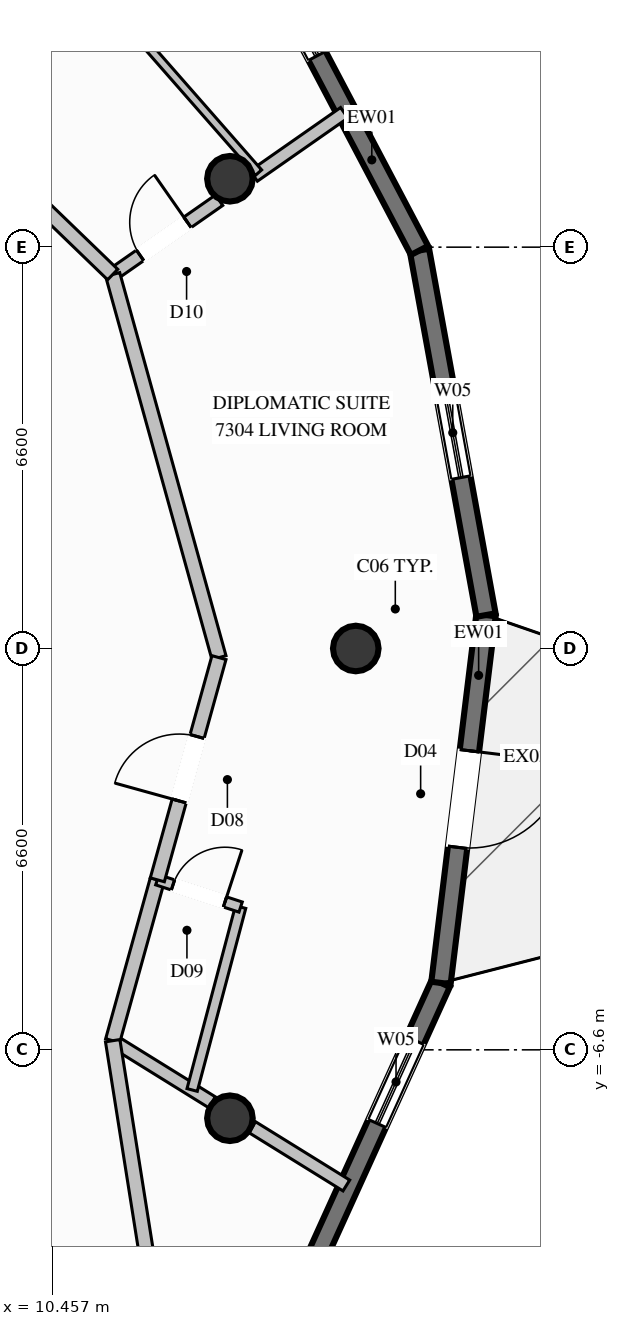
"""IFC4 building model, lengths in metres.
Left out: names, types, materials, properties, quantities, classifications, styles, units other than length and angle.
Written with IfcOpenShell. Run it as: python <this file> out.ifc"""

import sys

from ifc_helpers import new_model, si_unit, direction, frame, frame_2d, origin, origin_2d, place, context, subcontext, project, spatial, rectangle, circle, extrude, element, fill, save


model = new_model("IFC4")
c1 = context("Model", 3, precision=1e-05, world=origin(), true_north=direction((0.0, 1.0)))
c2 = subcontext(c1, "Body", "Model", "MODEL_VIEW")
j1 = project(units=[si_unit("LENGTHUNIT", "METRE"), si_unit("PLANEANGLEUNIT", "RADIAN")], contexts=[c1])
p1 = place(None, origin())
s1 = spatial("IfcSite", under=j1, at=p1, CompositionType="ELEMENT")
p2 = place(p1, origin())
s2 = spatial("IfcBuilding", under=s1, at=p2, CompositionType="ELEMENT")
p3 = place(p2, frame((0.0, 0.0, 274.4)))
s3 = spatial("IfcBuildingStorey", under=s2, at=p3, CompositionType="ELEMENT", Elevation=274.4)
for number, where, z_axis, x_axis in (
    (1, (15.45, 0.0, 0.0), (0.0, 0.0, 1.0), (1.0, 0.0, 0.0)),
    (2, (13.38, 7.725, 0.0), (0.0, 0.0, 1.0), (1.0, 0.0, 0.0)),
    (3, (13.38, -7.725, 0.0), (0.0, 0.0, 1.0), (1.0, 0.0, 0.0)),
):
    element("IfcColumn", number, at=place(p3, frame(where, z_axis=z_axis, x_axis=x_axis)), inside=s3, PredefinedType="COLUMN", context=c2, shape_type="SweptSolid", body=[
        extrude(circle(Radius=0.375, at=origin_2d()), origin(), (0.0, 0.0, 1.0), 3.8),
    ])
p4 = place(p3, frame((16.851, -5.5, 0.0), z_axis=(0.0, 0.0, 1.0), x_axis=(-0.413325805639, -0.910583207836, 0.0)))
e4 = element("IfcWall", 4, at=p4, inside=s3, PredefinedType="SOLIDWALL", context=c2, shape_type="SweptSolid", body=[
    extrude(rectangle(XDim=6.053, YDim=0.32, at=frame_2d((3.027, 0.0))), origin(), (0.0, 0.0, 1.0), 3.57),
])
p5 = place(p4, frame((1.038, 0.0, 0.85)))
e5 = element("IfcOpeningElement", 5, at=p5, cuts=e4, PredefinedType="OPENING", context=c2, shape_type="SweptSolid", body=[
    extrude(rectangle(XDim=1.5, YDim=1.2, at=frame_2d((0.75, 0.6))), frame((0.0, 0.17, 0.0), z_axis=(0.0, -1.0, 0.0), x_axis=(1.0, 0.0, 0.0)), (0.0, 0.0, 1.0), 0.34),
])
p6 = place(p3, frame((17.592, 0.55, 0.0), z_axis=(0.0, 0.0, 1.0), x_axis=(-0.121564545791, -0.992583528579, 0.0)))
e6 = element("IfcWall", 6, at=p6, inside=s3, PredefinedType="SOLIDWALL", context=c2, shape_type="SweptSolid", body=[
    extrude(rectangle(XDim=6.095, YDim=0.32, at=frame_2d((3.048, 0.0))), origin(), (0.0, 0.0, 1.0), 3.57),
])
p7 = place(p6, frame((2.248, 0.0, 0.0)))
e7 = element("IfcOpeningElement", 7, at=p7, cuts=e6, PredefinedType="OPENING", context=c2, shape_type="SweptSolid", body=[
    extrude(rectangle(XDim=1.6, YDim=2.3, at=frame_2d((0.8, 1.15))), frame((0.0, 0.17, 0.0), z_axis=(0.0, -1.0, 0.0), x_axis=(1.0, 0.0, 0.0)), (0.0, 0.0, 1.0), 0.34),
])
p8 = place(p3, frame((16.498, 6.546, 0.0), z_axis=(0.0, 0.0, 1.0), x_axis=(0.179495230974, -0.983758843446, 0.0)))
e8 = element("IfcWall", 8, at=p8, inside=s3, PredefinedType="SOLIDWALL", context=c2, shape_type="SweptSolid", body=[
    extrude(rectangle(XDim=6.095, YDim=0.32, at=frame_2d((3.047, 0.0))), origin(), (0.0, 0.0, 1.0), 3.57),
])
p9 = place(p8, frame((2.297, 0.0, 0.85)))
e9 = element("IfcOpeningElement", 9, at=p9, cuts=e8, PredefinedType="OPENING", context=c2, shape_type="SweptSolid", body=[
    extrude(rectangle(XDim=1.5, YDim=1.2, at=frame_2d((0.75, 0.6))), frame((0.0, 0.17, 0.0), z_axis=(0.0, -1.0, 0.0), x_axis=(1.0, 0.0, 0.0)), (0.0, 0.0, 1.0), 0.34),
])
p10 = place(p3, frame((13.677, 11.902, 0.0), z_axis=(0.0, 0.0, 1.0), x_axis=(0.466004047649, -0.884782587744, 0.0)))
e10 = element("IfcWall", 10, at=p10, inside=s3, PredefinedType="SOLIDWALL", context=c2, shape_type="SweptSolid", body=[
    extrude(rectangle(XDim=6.054, YDim=0.32, at=frame_2d((3.027, 0.0))), origin(), (0.0, 0.0, 1.0), 3.57),
])
p11 = place(p10, frame((0.937, 0.0, 0.85)))
e11 = element("IfcOpeningElement", 11, at=p11, cuts=e10, PredefinedType="OPENING", context=c2, shape_type="SweptSolid", body=[
    extrude(rectangle(XDim=1.5, YDim=1.2, at=frame_2d((0.75, 0.6))), frame((0.0, 0.17, 0.0), z_axis=(0.0, -1.0, 0.0), x_axis=(1.0, 0.0, 0.0)), (0.0, 0.0, 1.0), 0.34),
])
p12 = place(p3, frame((11.452, 6.15, 0.0), z_axis=(0.0, 0.0, 1.0), x_axis=(0.819854753172, 0.572571553346, 0.0)))
e12 = element("IfcWall", 12, at=p12, inside=s3, PredefinedType="PARTITIONING", context=c2, shape_type="SweptSolid", body=[
    extrude(rectangle(XDim=2.135, YDim=0.21, at=frame_2d((1.067, 0.0))), origin(), (0.0, 0.0, 1.0), 3.086),
])
p13 = place(p12, frame((0.55, 0.0, 0.0)))
e13 = element("IfcOpeningElement", 13, at=p13, cuts=e12, PredefinedType="OPENING", context=c2, shape_type="SweptSolid", body=[
    extrude(rectangle(XDim=0.95, YDim=2.1, at=frame_2d((0.475, 1.05))), frame((0.0, 0.115, 0.0), z_axis=(0.0, -1.0, 0.0), x_axis=(1.0, 0.0, 0.0)), (0.0, 0.0, 1.0), 0.23),
])
p14 = place(p3, frame((13.772, 7.771, 0.0), z_axis=(0.0, 0.0, 1.0), x_axis=(0.81989494027, 0.572514005872, 0.0)))
e14 = element("IfcWall", 14, at=p14, inside=s3, PredefinedType="PARTITIONING", context=c2, shape_type="SweptSolid", body=[
    extrude(rectangle(XDim=1.815, YDim=0.21, at=frame_2d((0.907, 0.0))), origin(), (0.0, 0.0, 1.0), 3.57),
])
p15 = place(p3, frame((11.452, -6.45, 0.0), z_axis=(0.0, 0.0, 1.0), x_axis=(0.850026735641, -0.526739545407, 0.0)))
e15 = element("IfcWall", 15, at=p15, inside=s3, PredefinedType="PARTITIONING", context=c2, shape_type="SweptSolid", body=[
    extrude(rectangle(XDim=1.921, YDim=0.21, at=frame_2d((0.96, 0.0))), origin(), (0.0, 0.0, 1.0), 3.086),
])
p16 = place(p3, frame((13.747, -7.872, 0.0), z_axis=(0.0, 0.0, 1.0), x_axis=(0.850070781835, -0.526668459156, 0.0)))
e16 = element("IfcWall", 16, at=p16, inside=s3, PredefinedType="PARTITIONING", context=c2, shape_type="SweptSolid", body=[
    extrude(rectangle(XDim=1.821, YDim=0.21, at=frame_2d((0.91, 0.0))), origin(), (0.0, 0.0, 1.0), 3.57),
])
p17 = place(p3, frame((11.452, -6.45, 0.0), z_axis=(0.0, 0.0, 1.0), x_axis=(0.267350374135, 0.963599386389, 0.0)))
e17 = element("IfcWall", 17, at=p17, inside=s3, PredefinedType="PARTITIONING", context=c2, shape_type="SweptSolid", body=[
    extrude(rectangle(XDim=2.746, YDim=0.24, at=frame_2d((1.373, 0.0))), origin(), (0.0, 0.0, 1.0), 3.57),
])
p18 = place(p3, frame((12.759, -7.26, 0.0), z_axis=(0.0, 0.0, 1.0), x_axis=(0.256080164753, 0.966655548383, 0.0)))
e18 = element("IfcWall", 18, at=p18, inside=s3, PredefinedType="PLUMBINGWALL", context=c2, shape_type="SweptSolid", body=[
    extrude(rectangle(XDim=3.112, YDim=0.175, at=frame_2d((1.556, 0.0))), origin(), (0.0, 0.0, 1.0), 3.57),
])
p19 = place(p3, frame((12.186, -3.804, 0.0), z_axis=(0.0, 0.0, 1.0), x_axis=(0.950463569657, -0.310835974037, 0.0)))
e19 = element("IfcWall", 19, at=p19, inside=s3, PredefinedType="PLUMBINGWALL", context=c2, shape_type="SweptSolid", body=[
    extrude(rectangle(XDim=1.441, YDim=0.175, at=frame_2d((0.721, 0.0))), origin(), (0.0, 0.0, 1.0), 3.57),
])
p20 = place(p19, frame((0.271, 0.0, 0.0)))
e20 = element("IfcOpeningElement", 20, at=p20, cuts=e19, PredefinedType="OPENING", context=c2, shape_type="SweptSolid", body=[
    extrude(rectangle(XDim=0.9, YDim=2.1, at=frame_2d((0.45, 1.05))), frame((0.0, 0.098, 0.0), z_axis=(0.0, -1.0, 0.0), x_axis=(1.0, 0.0, 0.0)), (0.0, 0.0, 1.0), 0.195),
])
p21 = place(p3, frame((13.2, -0.15, 0.0), z_axis=(0.0, 0.0, 1.0), x_axis=(-0.267374214985, 0.963592771435, 0.0)))
e21 = element("IfcWall", 21, at=p21, inside=s3, PredefinedType="PARTITIONING", context=c2, shape_type="SweptSolid", body=[
    extrude(rectangle(XDim=6.538, YDim=0.24, at=frame_2d((3.269, 0.0))), origin(), (0.0, 0.0, 1.0), 3.57),
])
p22 = place(p3, frame((12.186, -3.804, 0.0), z_axis=(0.0, 0.0, 1.0), x_axis=(0.267374891444, 0.963592583733, 0.0)))
e22 = element("IfcWall", 22, at=p22, inside=s3, PredefinedType="PARTITIONING", context=c2, shape_type="SweptSolid", body=[
    extrude(rectangle(XDim=3.792, YDim=0.24, at=frame_2d((1.896, 0.0))), origin(), (0.0, 0.0, 1.0), 3.57),
])
p23 = place(p22, frame((1.346, 0.0, 0.0)))
e23 = element("IfcOpeningElement", 23, at=p23, cuts=e22, PredefinedType="OPENING", context=c2, shape_type="SweptSolid", body=[
    extrude(rectangle(XDim=1.1, YDim=2.3, at=frame_2d((0.55, 1.15))), frame((0.0, 0.13, 0.0), z_axis=(0.0, -1.0, 0.0), x_axis=(1.0, 0.0, 0.0)), (0.0, 0.0, 1.0), 0.26),
])
p24 = place(p3, frame((11.452, 6.15, 0.0), z_axis=(0.0, 0.0, 1.0), x_axis=(-0.719407162497, 0.694588608133, 0.0)))
e24 = element("IfcWall", 24, at=p24, inside=s3, PredefinedType="PARTITIONING", context=c2, shape_type="SweptSolid", body=[
    extrude(rectangle(XDim=6.64, YDim=0.24, at=frame_2d((3.32, 0.0))), origin(), (0.0, 0.0, 1.0), 3.57),
])
p25 = place(p3, frame((13.851, 7.826, 0.0), z_axis=(0.0, 0.0, 1.0), x_axis=(-0.659356064883, 0.751830818537, 0.0)))
e25 = element("IfcWall", 25, at=p25, inside=s3, PredefinedType="PARTITIONING", context=c2, shape_type="SweptSolid", body=[
    extrude(rectangle(XDim=8.38, YDim=0.135, at=frame_2d((4.19, 0.0))), origin(), (0.0, 0.0, 1.0), 3.005),
])
p26 = place(p25, frame((3.715, 0.0, 0.0)))
e26 = element("IfcOpeningElement", 26, at=p26, cuts=e25, PredefinedType="OPENING", context=c2, shape_type="SweptSolid", body=[
    extrude(rectangle(XDim=0.95, YDim=2.1, at=frame_2d((0.475, 1.05))), frame((0.0, 0.078, 0.0), z_axis=(0.0, -1.0, 0.0), x_axis=(1.0, 0.0, 0.0)), (0.0, 0.0, 1.0), 0.155),
])
p27 = place(p3, frame((12.3, -11.8, 0.0), z_axis=(0.0, 0.0, 1.0), x_axis=(-0.156573548098, 0.987666301964, 0.0)))
e27 = element("IfcWall", 27, at=p27, inside=s3, PredefinedType="PARTITIONING", context=c2, shape_type="SweptSolid", body=[
    extrude(rectangle(XDim=5.417, YDim=0.24, at=frame_2d((2.708, 0.0))), origin(), (0.0, 0.0, 1.0), 3.57),
])
p28 = place(p5, origin())
e28 = element("IfcWindow", 28, at=p28, inside=s3, PartitioningType="SINGLE_PANEL", PredefinedType="WINDOW", context=c2, shape_type="SweptSolid", body=[
    extrude(rectangle(XDim=1.5, YDim=1.2, at=frame_2d((0.75, 0.6))), frame((0.0, 0.03, 0.0), z_axis=(0.0, -1.0, 0.0), x_axis=(1.0, 0.0, 0.0)), (0.0, 0.0, 1.0), 0.06),
])
fill(e5, e28)
p29 = place(p7, origin())
e29 = element("IfcDoor", 29, at=p29, inside=s3, OperationType="SINGLE_SWING_LEFT", PredefinedType="DOOR", context=c2, shape_type="SweptSolid", body=[
    extrude(rectangle(XDim=1.6, YDim=2.3, at=frame_2d((0.8, 1.15))), frame((0.0, 0.025, 0.0), z_axis=(0.0, -1.0, 0.0), x_axis=(1.0, 0.0, 0.0)), (0.0, 0.0, 1.0), 0.05),
])
fill(e7, e29)
p30 = place(p9, origin())
e30 = element("IfcWindow", 30, at=p30, inside=s3, PartitioningType="SINGLE_PANEL", PredefinedType="WINDOW", context=c2, shape_type="SweptSolid", body=[
    extrude(rectangle(XDim=1.5, YDim=1.2, at=frame_2d((0.75, 0.6))), frame((0.0, 0.03, 0.0), z_axis=(0.0, -1.0, 0.0), x_axis=(1.0, 0.0, 0.0)), (0.0, 0.0, 1.0), 0.06),
])
fill(e9, e30)
p31 = place(p11, origin())
e31 = element("IfcWindow", 31, at=p31, inside=s3, PartitioningType="SINGLE_PANEL", PredefinedType="WINDOW", context=c2, shape_type="SweptSolid", body=[
    extrude(rectangle(XDim=1.5, YDim=1.2, at=frame_2d((0.75, 0.6))), frame((0.0, 0.03, 0.0), z_axis=(0.0, -1.0, 0.0), x_axis=(1.0, 0.0, 0.0)), (0.0, 0.0, 1.0), 0.06),
])
fill(e11, e31)
p32 = place(p20, origin())
e32 = element("IfcDoor", 32, at=p32, inside=s3, OperationType="SINGLE_SWING_RIGHT", PredefinedType="DOOR", context=c2, shape_type="SweptSolid", body=[
    extrude(rectangle(XDim=0.9, YDim=2.1, at=frame_2d((0.45, 1.05))), frame((0.0, 0.025, 0.0), z_axis=(0.0, -1.0, 0.0), x_axis=(1.0, 0.0, 0.0)), (0.0, 0.0, 1.0), 0.05),
])
fill(e20, e32)
p33 = place(p23, origin())
e33 = element("IfcDoor", 33, at=p33, inside=s3, OperationType="SINGLE_SWING_LEFT", PredefinedType="DOOR", context=c2, shape_type="SweptSolid", body=[
    extrude(rectangle(XDim=1.1, YDim=2.3, at=frame_2d((0.55, 1.15))), frame((0.0, 0.025, 0.0), z_axis=(0.0, -1.0, 0.0), x_axis=(1.0, 0.0, 0.0)), (0.0, 0.0, 1.0), 0.05),
])
fill(e23, e33)
p34 = place(p13, origin())
e34 = element("IfcDoor", 34, at=p34, inside=s3, OperationType="SINGLE_SWING_RIGHT", PredefinedType="DOOR", context=c2, shape_type="SweptSolid", body=[
    extrude(rectangle(XDim=0.95, YDim=2.1, at=frame_2d((0.475, 1.05))), frame((0.0, 0.025, 0.0), z_axis=(0.0, -1.0, 0.0), x_axis=(1.0, 0.0, 0.0)), (0.0, 0.0, 1.0), 0.05),
])
fill(e13, e34)
save(model, sys.argv[1])
